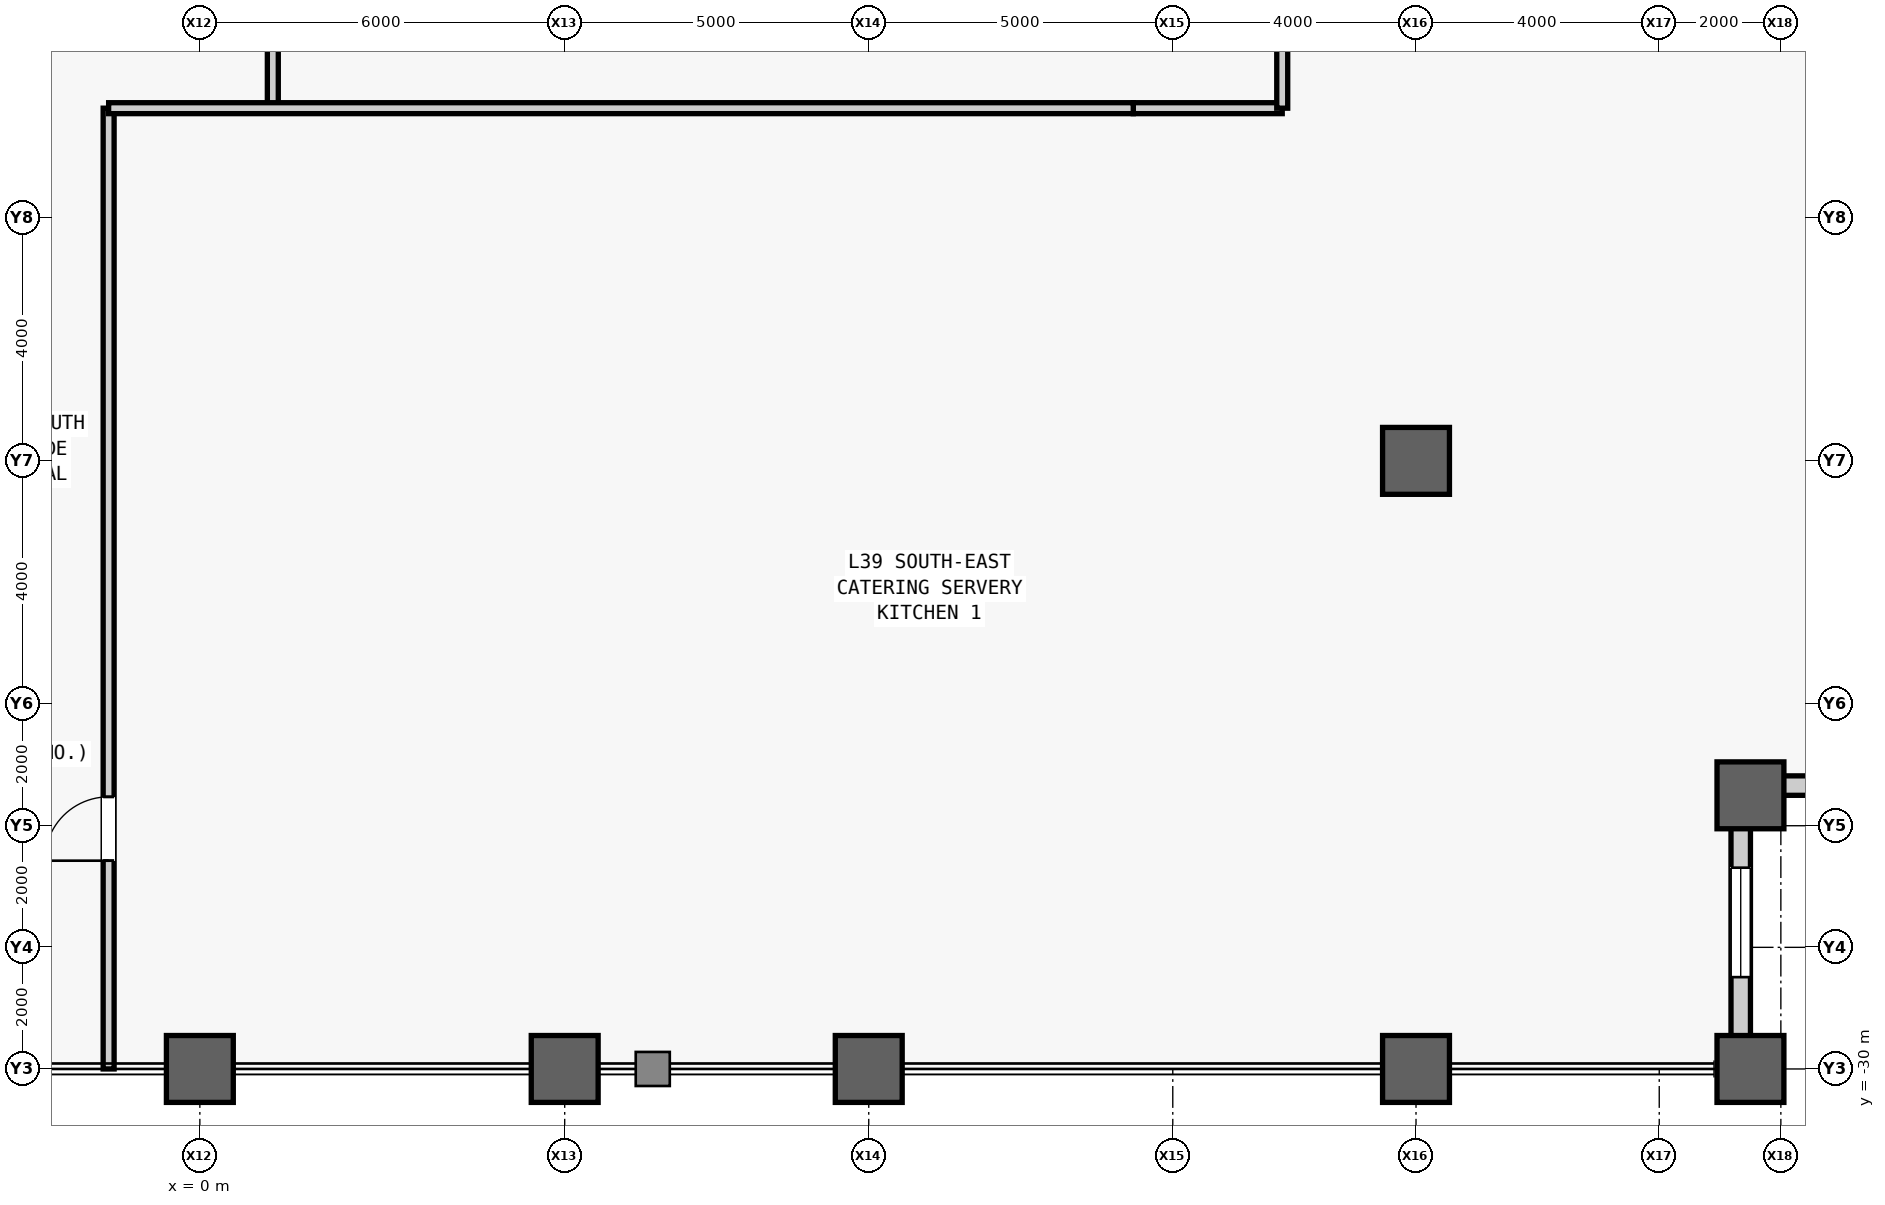
"""IFC4 building model, lengths in metres.
Left out: names, types, materials, properties, quantities, classifications, styles, units other than length and angle.
Written with IfcOpenShell. Run it as: python <this file> out.ifc"""

import sys

from ifc_helpers import new_model, si_unit, direction, frame, frame_2d, origin, origin_2d, place, context, subcontext, project, spatial, rectangle, hollow_rectangle, extrude, source, transform, mapped, element, fill, save


model = new_model("IFC4")
c1 = context("Model", 3, precision=1e-05, world=origin(), true_north=direction((0.0, 1.0)))
c2 = subcontext(c1, "Body", "Model", "MODEL_VIEW")
j1 = project(units=[si_unit("LENGTHUNIT", "METRE"), si_unit("PLANEANGLEUNIT", "RADIAN")], contexts=[c1])
p1 = place(None, origin())
s1 = spatial("IfcSite", under=j1, at=p1, CompositionType="ELEMENT")
p2 = place(p1, origin())
s2 = spatial("IfcBuilding", under=s1, at=p2, CompositionType="ELEMENT")
p3 = place(p2, frame((0.0, 0.0, 171.1)))
s3 = spatial("IfcBuildingStorey", under=s2, at=p3, CompositionType="ELEMENT", Elevation=171.1)
m1 = source(origin(), c2, "Body", "SweptSolid", [
    extrude(hollow_rectangle(XDim=1.1, YDim=1.1, WallThickness=0.06, at=origin_2d()), origin(), (0.0, 0.0, 1.0), 4.0),
])
for number, where, z_axis, x_axis in (
    (1, (0.0, -30.0, 0.0), (0.0, 0.0, 1.0), (1.0, 0.0, 0.0)),
    (2, (6.0, -30.0, 0.0), (0.0, 0.0, 1.0), (1.0, 0.0, 0.0)),
    (3, (11.0, -30.0, 0.0), (0.0, 0.0, 1.0), (1.0, 0.0, 0.0)),
    (4, (20.0, -30.0, 0.0), (0.0, 0.0, 1.0), (1.0, 0.0, 0.0)),
    (5, (20.0, -20.0, 0.0), (0.0, 0.0, 1.0), (1.0, 0.0, 0.0)),
    (6, (25.5, -30.0, 0.0), (0.0, 0.0, 1.0), (1.0, 0.0, 0.0)),
    (7, (25.5, -25.5, 0.0), (0.0, 0.0, 1.0), (1.0, 0.0, 0.0)),
):
    element("IfcColumn", number, at=place(p3, frame(where, z_axis=z_axis, x_axis=x_axis)), inside=s3, PredefinedType="COLUMN", context=c2, shape_type="MappedRepresentation", body=[
        mapped(m1, transform((0.0, 0.0, 0.0), scale=1.0)),
    ])
m2 = source(origin(), c2, "Body", "SweptSolid", [
    extrude(rectangle(XDim=4.18, YDim=0.32, at=frame_2d((2.09, 0.0))), origin(), (0.0, 0.0, 1.0), 3.164),
])
p4 = place(p3, frame((25.34, -29.68, 0.0), z_axis=(0.0, 0.0, 1.0), x_axis=(0.0, 1.0, 0.0)))
e8 = element("IfcWall", 8, at=p4, inside=s3, PredefinedType="STANDARD", context=c2, shape_type="MappedRepresentation", body=[
    mapped(m2, transform((0.0, 0.0, 0.0), scale=1.0)),
])
m3 = source(origin(), c2, "Body", "SweptSolid", [
    extrude(rectangle(XDim=1.8, YDim=2.4, at=frame_2d((0.9, 1.2))), frame((0.0, 0.17, 0.0), z_axis=(0.0, -1.0, 0.0), x_axis=(1.0, 0.0, 0.0)), (0.0, 0.0, 1.0), 0.34),
])
p5 = place(p4, frame((1.19, 0.0, 0.5)))
e9 = element("IfcOpeningElement", 9, at=p5, cuts=e8, PredefinedType="OPENING", context=c2, shape_type="MappedRepresentation", body=[
    mapped(m3, transform((0.0, 0.0, 0.0), scale=1.0)),
])
p6 = place(p3, frame((25.5, -25.34, 0.0), z_axis=(0.0, 0.0, 1.0), x_axis=(1.0, 0.0, 0.0)))
e10 = element("IfcWall", 10, at=p6, inside=s3, PredefinedType="STANDARD", context=c2, shape_type="MappedRepresentation", body=[
    mapped(m2, transform((0.0, 0.0, 0.0), scale=1.0)),
])
p7 = place(p6, frame((1.19, 0.0, 0.5)))
e11 = element("IfcOpeningElement", 11, at=p7, cuts=e10, PredefinedType="OPENING", context=c2, shape_type="MappedRepresentation", body=[
    mapped(m3, transform((0.0, 0.0, 0.0), scale=1.0)),
])
m4 = source(origin(), c2, "Body", "SweptSolid", [
    extrude(rectangle(XDim=2.45, YDim=0.18, at=frame_2d((1.225, 0.0))), origin(), (0.0, 0.0, 1.0), 3.78),
])
p8 = place(p3, frame((15.35, -14.2, 0.0), z_axis=(0.0, 0.0, 1.0), x_axis=(1.0, 0.0, 0.0)))
e12 = element("IfcWall", 12, at=p8, inside=s3, PredefinedType="PARTITIONING", context=c2, shape_type="MappedRepresentation", body=[
    mapped(m4, transform((0.0, 0.0, 0.0), scale=1.0)),
])
m5 = source(origin(), c2, "Body", "SweptSolid", [
    extrude(rectangle(XDim=3.2, YDim=0.18, at=frame_2d((1.6, 0.0))), origin(), (0.0, 0.0, 1.0), 3.78),
])
p9 = place(p3, frame((1.2, -14.2, 0.0), z_axis=(0.0, 0.0, 1.0), x_axis=(0.0, 1.0, 0.0)))
e13 = element("IfcWall", 13, at=p9, inside=s3, PredefinedType="PARTITIONING", context=c2, shape_type="MappedRepresentation", body=[
    mapped(m5, transform((0.0, 0.0, 0.0), scale=1.0)),
])
m6 = source(origin(), c2, "Body", "SweptSolid", [
    extrude(rectangle(XDim=15.8, YDim=0.18, at=frame_2d((7.9, 0.0))), origin(), (0.0, 0.0, 1.0), 3.78),
])
p10 = place(p3, frame((-1.5, -30.0, 0.0), z_axis=(0.0, 0.0, 1.0), x_axis=(0.0, 1.0, 0.0)))
e14 = element("IfcWall", 14, at=p10, inside=s3, PredefinedType="PARTITIONING", context=c2, shape_type="MappedRepresentation", body=[
    mapped(m6, transform((0.0, 0.0, 0.0), scale=1.0)),
])
m7 = source(origin(), c2, "Body", "SweptSolid", [
    extrude(rectangle(XDim=1.05, YDim=2.2, at=frame_2d((0.525, 1.1))), frame((0.0, 0.1, 0.0), z_axis=(0.0, -1.0, 0.0), x_axis=(1.0, 0.0, 0.0)), (0.0, 0.0, 1.0), 0.2),
])
p11 = place(p10, frame((3.425, 0.0, 0.0)))
e15 = element("IfcOpeningElement", 15, at=p11, cuts=e14, PredefinedType="OPENING", context=c2, shape_type="MappedRepresentation", body=[
    mapped(m7, transform((0.0, 0.0, 0.0), scale=1.0)),
])
m8 = source(origin(), c2, "Body", "SweptSolid", [
    extrude(rectangle(XDim=16.85, YDim=0.18, at=frame_2d((8.425, 0.0))), origin(), (0.0, 0.0, 1.0), 3.78),
])
p12 = place(p3, frame((-1.5, -14.2, 0.0), z_axis=(0.0, 0.0, 1.0), x_axis=(1.0, 0.0, 0.0)))
e16 = element("IfcWall", 16, at=p12, inside=s3, PredefinedType="PARTITIONING", context=c2, shape_type="MappedRepresentation", body=[
    mapped(m8, transform((0.0, 0.0, 0.0), scale=1.0)),
])
m9 = source(origin(), c2, "Body", "SweptSolid", [
    extrude(rectangle(XDim=18.95, YDim=0.18, at=frame_2d((9.475, 0.0))), origin(), (0.0, 0.0, 1.0), 3.78),
])
p13 = place(p3, frame((17.8, -14.2, 0.0), z_axis=(0.0, 0.0, 1.0), x_axis=(0.0, 1.0, 0.0)))
e17 = element("IfcWall", 17, at=p13, inside=s3, PredefinedType="PARTITIONING", context=c2, shape_type="MappedRepresentation", body=[
    mapped(m9, transform((0.0, 0.0, 0.0), scale=1.0)),
])
m10 = source(origin(), c2, "Body", "SweptSolid", [
    extrude(rectangle(XDim=1.8, YDim=2.4, at=frame_2d((0.9, 1.2))), frame((0.0, 0.03, 0.0), z_axis=(0.0, -1.0, 0.0), x_axis=(1.0, 0.0, 0.0)), (0.0, 0.0, 1.0), 0.06),
])
p14 = place(p5, origin())
e18 = element("IfcWindow", 18, at=p14, inside=s3, PartitioningType="SINGLE_PANEL", PredefinedType="WINDOW", context=c2, shape_type="MappedRepresentation", body=[
    mapped(m10, transform((0.0, 0.0, 0.0), scale=1.0)),
])
fill(e9, e18)
m11 = source(origin(), c2, "Body", "SweptSolid", [
    extrude(rectangle(XDim=1.05, YDim=2.2, at=frame_2d((0.525, 1.1))), frame((0.0, 0.025, 0.0), z_axis=(0.0, -1.0, 0.0), x_axis=(1.0, 0.0, 0.0)), (0.0, 0.0, 1.0), 0.05),
])
p15 = place(p11, origin())
e19 = element("IfcDoor", 19, at=p15, inside=s3, OperationType="SINGLE_SWING_LEFT", PredefinedType="DOOR", context=c2, shape_type="MappedRepresentation", body=[
    mapped(m11, transform((0.0, 0.0, 0.0), scale=1.0)),
])
fill(e15, e19)
save(model, sys.argv[1])
